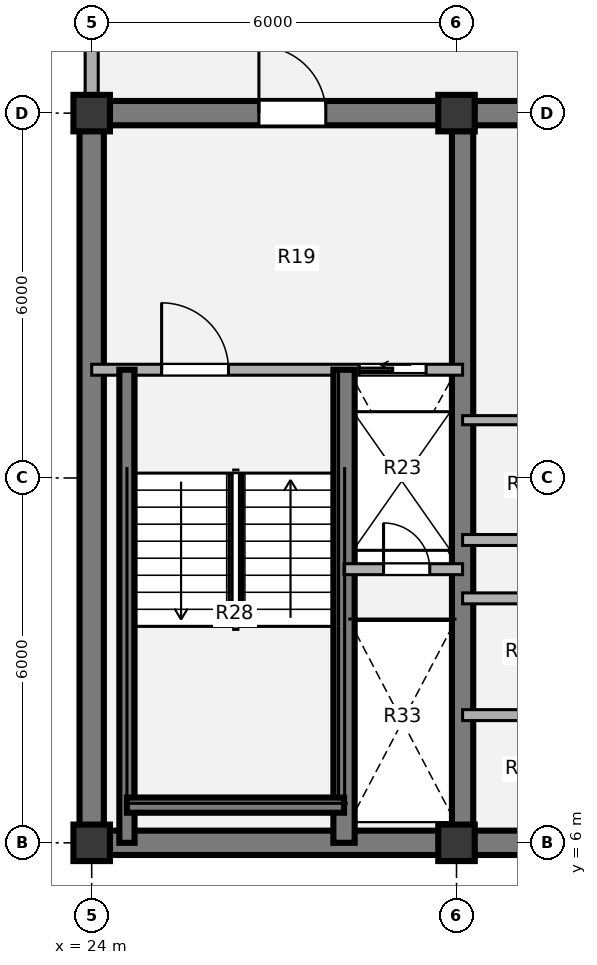
"""IFC4 building model, lengths in metres.
Left out: names, types, materials, properties, quantities, classifications, styles, units other than length and angle.
Written with IfcOpenShell. Run it as: python <this file> out.ifc"""

import sys

from ifc_helpers import new_model, si_unit, direction, frame, frame_2d, origin, origin_2d, place, context, subcontext, project, spatial, rectangle, extrude, source, transform, mapped, element, fill, save


model = new_model("IFC4")
c1 = context("Model", 3, precision=1e-05, world=origin(), true_north=direction((0.0, 1.0)))
c2 = subcontext(c1, "Body", "Model", "MODEL_VIEW")
j1 = project(units=[si_unit("LENGTHUNIT", "METRE"), si_unit("PLANEANGLEUNIT", "RADIAN")], contexts=[c1])
p1 = place(None, origin())
s1 = spatial("IfcSite", under=j1, at=p1, CompositionType="ELEMENT")
p2 = place(p1, origin())
s2 = spatial("IfcBuilding", under=s1, at=p2, CompositionType="ELEMENT")
p3 = place(p2, frame((0.0, 0.0, 245.7)))
s3 = spatial("IfcBuildingStorey", under=s2, at=p3, CompositionType="ELEMENT", Elevation=245.7)
m1 = source(origin(), c2, "Body", "SweptSolid", [
    extrude(rectangle(XDim=0.6, YDim=0.6, at=origin_2d()), origin(), (0.0, 0.0, 1.0), 3.78),
])
for number, where, z_axis, x_axis in (
    (1, (24.0, 6.0, 0.0), (0.0, 0.0, 1.0), (1.0, 0.0, 0.0)),
    (2, (30.0, 6.0, 0.0), (0.0, 0.0, 1.0), (1.0, 0.0, 0.0)),
    (3, (24.0, 18.0, 0.0), (0.0, 0.0, 1.0), (1.0, 0.0, 0.0)),
    (4, (30.0, 18.0, 0.0), (0.0, 0.0, 1.0), (1.0, 0.0, 0.0)),
):
    element("IfcColumn", number, at=place(p3, frame(where, z_axis=z_axis, x_axis=x_axis)), inside=s3, PredefinedType="COLUMN", context=c2, shape_type="MappedRepresentation", body=[
        mapped(m1, transform((0.0, 0.0, 0.0), x_axis=(1.0, 0.0, 0.0), y_axis=(0.0, 1.0, 0.0), z_axis=(0.0, 0.0, 1.0), scale=1.0)),
    ])
p4 = place(p3, frame((48.2, 6.0, 0.0), z_axis=(0.0, 0.0, 1.0), x_axis=(-1.0, 0.0, 0.0)))
e5 = element("IfcWall", 5, at=p4, inside=s3, PredefinedType="SHEAR", context=c2, shape_type="SweptSolid", body=[
    extrude(rectangle(XDim=24.4, YDim=0.4, at=frame_2d((12.2, 0.0))), origin(), (0.0, 0.0, 1.0), 3.78),
])
p5 = place(p3, frame((24.0, 6.0, 0.0), z_axis=(0.0, 0.0, 1.0), x_axis=(0.0, 1.0, 0.0)))
e6 = element("IfcWall", 6, at=p5, inside=s3, PredefinedType="SHEAR", context=c2, shape_type="SweptSolid", body=[
    extrude(rectangle(XDim=12.0, YDim=0.4, at=frame_2d((6.0, 0.0))), origin(), (0.0, 0.0, 1.0), 3.78),
])
p6 = place(p3, frame((23.8, 18.0, 0.0), z_axis=(0.0, 0.0, 1.0), x_axis=(1.0, 0.0, 0.0)))
e7 = element("IfcWall", 7, at=p6, inside=s3, PredefinedType="SHEAR", context=c2, shape_type="SweptSolid", body=[
    extrude(rectangle(XDim=9.4, YDim=0.4, at=frame_2d((4.7, 0.0))), origin(), (0.0, 0.0, 1.0), 3.78),
])
p7 = place(p6, frame((2.95, 0.0, 0.0)))
e8 = element("IfcOpeningElement", 8, at=p7, cuts=e7, PredefinedType="OPENING", context=c2, shape_type="SweptSolid", body=[
    extrude(rectangle(XDim=1.1, YDim=2.1, at=origin_2d()), frame((0.55, 0.21, 1.05), z_axis=(0.0, -1.0, 0.0), x_axis=(1.0, 0.0, 0.0)), (0.0, 0.0, 1.0), 0.42),
])
p8 = place(p3, frame((30.1, 6.0, 0.0), z_axis=(0.0, 0.0, 1.0), x_axis=(0.0, 1.0, 0.0)))
e9 = element("IfcWall", 9, at=p8, inside=s3, PredefinedType="SHEAR", context=c2, shape_type="SweptSolid", body=[
    extrude(rectangle(XDim=12.0, YDim=0.35, at=frame_2d((6.0, 0.0))), origin(), (0.0, 0.0, 1.0), 3.78),
])
p9 = place(p3, frame((24.0, 18.28, 0.0), z_axis=(0.0, 0.0, 1.0), x_axis=(0.0, 1.0, 0.0)))
e10 = element("IfcWall", 10, at=p9, inside=s3, PredefinedType="SOLIDWALL", context=c2, shape_type="SweptSolid", body=[
    extrude(rectangle(XDim=2.77, YDim=0.215, at=frame_2d((1.385, 0.0))), origin(), (0.0, 0.0, 1.0), 2.718),
])
p10 = place(p3, frame((30.1, 12.95, 0.0), z_axis=(0.0, 0.0, 1.0), x_axis=(1.0, 0.0, 0.0)))
e11 = element("IfcWall", 11, at=p10, inside=s3, PredefinedType="PARTITIONING", context=c2, shape_type="SweptSolid", body=[
    extrude(rectangle(XDim=2.5, YDim=0.15, at=frame_2d((1.25, 0.0))), origin(), (0.0, 0.0, 1.0), 3.5),
])
for number, where, z_axis, x_axis in (
    (12, (30.1, 10.98, 0.0), (0.0, 0.0, 1.0), (1.0, 0.0, 0.0)),
    (13, (30.1, 8.1, 0.0), (0.0, 0.0, 1.0), (1.0, 0.0, 0.0)),
    (14, (30.1, 10.02, 0.0), (0.0, 0.0, 1.0), (1.0, 0.0, 0.0)),
):
    element("IfcWall", number, at=place(p3, frame(where, z_axis=z_axis, x_axis=x_axis)), inside=s3, PredefinedType="PARTITIONING", context=c2, shape_type="SweptSolid", body=[
        extrude(rectangle(XDim=2.5, YDim=0.18, at=frame_2d((1.25, 0.0))), origin(), (0.0, 0.0, 1.0), 3.5),
    ])
p11 = place(p3, frame((24.0, 13.78, 0.0), z_axis=(0.0, 0.0, 1.0), x_axis=(1.0, 0.0, 0.0)))
e15 = element("IfcWall", 15, at=p11, inside=s3, PredefinedType="PARTITIONING", context=c2, shape_type="SweptSolid", body=[
    extrude(rectangle(XDim=6.1, YDim=0.18, at=frame_2d((3.05, 0.0))), origin(), (0.0, 0.0, 1.0), 3.5),
])
p12 = place(p11, frame((1.15, 0.0, 0.0)))
e16 = element("IfcOpeningElement", 16, at=p12, cuts=e15, PredefinedType="OPENING", context=c2, shape_type="SweptSolid", body=[
    extrude(rectangle(XDim=1.1, YDim=2.1, at=origin_2d()), frame((0.55, 0.1, 1.05), z_axis=(0.0, -1.0, 0.0), x_axis=(1.0, 0.0, 0.0)), (0.0, 0.0, 1.0), 0.2),
])
p13 = place(p11, frame((4.4, 0.0, 0.0)))
e17 = element("IfcOpeningElement", 17, at=p13, cuts=e15, PredefinedType="OPENING", context=c2, shape_type="SweptSolid", body=[
    extrude(rectangle(XDim=1.1, YDim=2.1, at=origin_2d()), frame((0.55, 0.1, 1.05), z_axis=(0.0, -1.0, 0.0), x_axis=(1.0, 0.0, 0.0)), (0.0, 0.0, 1.0), 0.2),
])
p14 = place(p3, frame((28.15, 6.0, 0.0), z_axis=(0.0, 0.0, 1.0), x_axis=(0.0, 1.0, 0.0)))
e18 = element("IfcWall", 18, at=p14, inside=s3, PredefinedType="SHEAR", context=c2, shape_type="SweptSolid", body=[
    extrude(rectangle(XDim=7.78, YDim=0.35, at=frame_2d((3.89, 0.0))), origin(), (0.0, 0.0, 1.0), 3.85),
])
p15 = place(p3, frame((24.58, 6.0, 0.0), z_axis=(0.0, 0.0, 1.0), x_axis=(0.0, 1.0, 0.0)))
e19 = element("IfcWall", 19, at=p15, inside=s3, PredefinedType="SHEAR", context=c2, shape_type="SweptSolid", body=[
    extrude(rectangle(XDim=7.78, YDim=0.25, at=frame_2d((3.89, 0.0))), origin(), (0.0, 0.0, 1.0), 3.85),
])
p16 = place(p3, frame((24.58, 6.62, 0.0), z_axis=(0.0, 0.0, 1.0), x_axis=(1.0, 0.0, 0.0)))
e20 = element("IfcWall", 20, at=p16, inside=s3, PredefinedType="SHEAR", context=c2, shape_type="SweptSolid", body=[
    extrude(rectangle(XDim=3.57, YDim=0.25, at=frame_2d((1.785, 0.0))), origin(), (0.0, 0.0, 1.0), 3.85),
])
p17 = place(p3, frame((28.15, 10.5, 0.0), z_axis=(0.0, 0.0, 1.0), x_axis=(1.0, 0.0, 0.0)))
e21 = element("IfcWall", 21, at=p17, inside=s3, PredefinedType="PARTITIONING", context=c2, shape_type="SweptSolid", body=[
    extrude(rectangle(XDim=1.95, YDim=0.18, at=frame_2d((0.975, 0.0))), origin(), (0.0, 0.0, 1.0), 3.5),
])
p18 = place(p17, frame((0.65, 0.0, 0.0)))
e22 = element("IfcOpeningElement", 22, at=p18, cuts=e21, PredefinedType="OPENING", context=c2, shape_type="SweptSolid", body=[
    extrude(rectangle(XDim=0.76, YDim=2.05, at=origin_2d()), frame((0.38, 0.1, 1.025), z_axis=(0.0, -1.0, 0.0), x_axis=(1.0, 0.0, 0.0)), (0.0, 0.0, 1.0), 0.2),
])
m2 = source(origin(), c2, "Body", "SweptSolid", [
    extrude(rectangle(XDim=1.1, YDim=2.1, at=origin_2d()), frame((0.55, 0.025, 1.05), z_axis=(0.0, -1.0, 0.0), x_axis=(1.0, 0.0, 0.0)), (0.0, 0.0, 1.0), 0.05),
])
p19 = place(p12, origin())
e23 = element("IfcDoor", 23, at=p19, inside=s3, OperationType="SINGLE_SWING_LEFT", PredefinedType="DOOR", context=c2, shape_type="MappedRepresentation", body=[
    mapped(m2, transform((0.0, 0.0, 0.0), x_axis=(1.0, 0.0, 0.0), y_axis=(0.0, 1.0, 0.0), z_axis=(0.0, 0.0, 1.0), scale=1.0)),
])
fill(e16, e23)
m3 = source(origin(), c2, "Body", "SweptSolid", [
    extrude(rectangle(XDim=1.1, YDim=2.1, at=origin_2d()), frame((0.55, 0.025, 1.05), z_axis=(0.0, -1.0, 0.0), x_axis=(1.0, 0.0, 0.0)), (0.0, 0.0, 1.0), 0.05),
])
p20 = place(p13, origin())
e24 = element("IfcDoor", 24, at=p20, inside=s3, OperationType="SLIDING_TO_LEFT", PredefinedType="DOOR", context=c2, shape_type="MappedRepresentation", body=[
    mapped(m3, transform((0.0, 0.0, 0.0), x_axis=(1.0, 0.0, 0.0), y_axis=(0.0, 1.0, 0.0), z_axis=(0.0, 0.0, 1.0), scale=1.0)),
])
fill(e17, e24)
m4 = source(origin(), c2, "Body", "SweptSolid", [
    extrude(rectangle(XDim=0.76, YDim=2.05, at=origin_2d()), frame((0.38, 0.025, 1.025), z_axis=(0.0, -1.0, 0.0), x_axis=(1.0, 0.0, 0.0)), (0.0, 0.0, 1.0), 0.05),
])
p21 = place(p18, origin())
e25 = element("IfcDoor", 25, at=p21, inside=s3, OperationType="SINGLE_SWING_LEFT", PredefinedType="DOOR", context=c2, shape_type="MappedRepresentation", body=[
    mapped(m4, transform((0.0, 0.0, 0.0), x_axis=(1.0, 0.0, 0.0), y_axis=(0.0, 1.0, 0.0), z_axis=(0.0, 0.0, 1.0), scale=1.0)),
])
fill(e22, e25)
m5 = source(origin(), c2, "Body", "SweptSolid", [
    extrude(rectangle(XDim=1.1, YDim=2.1, at=origin_2d()), frame((0.55, 0.025, 1.05), z_axis=(0.0, -1.0, 0.0), x_axis=(1.0, 0.0, 0.0)), (0.0, 0.0, 1.0), 0.05),
])
p22 = place(p7, origin())
e26 = element("IfcDoor", 26, at=p22, inside=s3, OperationType="SINGLE_SWING_LEFT", PredefinedType="DOOR", context=c2, shape_type="MappedRepresentation", body=[
    mapped(m5, transform((0.0, 0.0, 0.0), x_axis=(1.0, 0.0, 0.0), y_axis=(0.0, 1.0, 0.0), z_axis=(0.0, 0.0, 1.0), scale=1.0)),
])
fill(e8, e26)
save(model, sys.argv[1])
